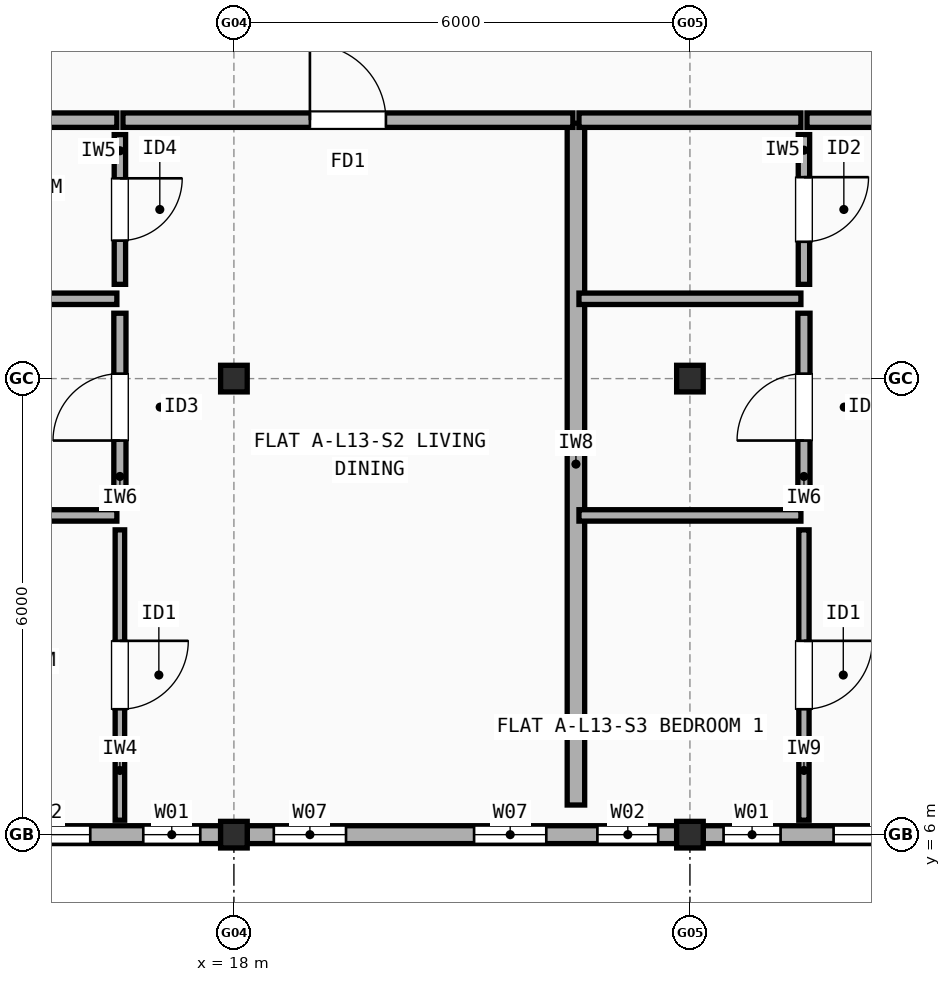
"""IFC4 building model, lengths in metres.
Left out: names, types, materials, properties, quantities, classifications, styles, units other than length and angle.
Written with IfcOpenShell. Run it as: python <this file> out.ifc"""

import sys

from ifc_helpers import new_model, si_unit, direction, frame, frame_2d, origin, origin_2d, place, context, subcontext, project, spatial, rectangle, extrude, element, fill, save


model = new_model("IFC4")
c1 = context("Model", 3, precision=1e-05, world=origin(), true_north=direction((0.0, 1.0)))
c2 = subcontext(c1, "Body", "Model", "MODEL_VIEW")
j1 = project(units=[si_unit("LENGTHUNIT", "METRE"), si_unit("PLANEANGLEUNIT", "RADIAN")], contexts=[c1])
p1 = place(None, origin())
s1 = spatial("IfcSite", under=j1, at=p1, CompositionType="ELEMENT")
p2 = place(p1, origin())
s2 = spatial("IfcBuilding", under=s1, at=p2, CompositionType="ELEMENT")
p3 = place(p2, frame((0.0, 0.0, 42.9)))
s3 = spatial("IfcBuildingStorey", under=s2, at=p3, CompositionType="ELEMENT", Elevation=42.9)
for number, where, z_axis, x_axis in (
    (1, (18.0, 6.0, 0.0), (0.0, 0.0, 1.0), (1.0, 0.0, 0.0)),
    (2, (18.0, 12.0, 0.0), (0.0, 0.0, 1.0), (1.0, 0.0, 0.0)),
    (3, (24.0, 6.0, 0.0), (0.0, 0.0, 1.0), (1.0, 0.0, 0.0)),
    (4, (24.0, 12.0, 0.0), (0.0, 0.0, 1.0), (1.0, 0.0, 0.0)),
):
    element("IfcColumn", number, at=place(p3, frame(where, z_axis=z_axis, x_axis=x_axis)), inside=s3, PredefinedType="COLUMN", context=c2, shape_type="SweptSolid", body=[
        extrude(rectangle(XDim=0.35, YDim=0.35, at=origin_2d()), origin(), (0.0, 0.0, 1.0), 3.005),
    ])
p4 = place(p3, frame((12.175, 6.0, 0.0), z_axis=(0.0, 0.0, 1.0), x_axis=(1.0, 0.0, 0.0)))
e5 = element("IfcWall", 5, at=p4, inside=s3, PredefinedType="STANDARD", context=c2, shape_type="SweptSolid", body=[
    extrude(rectangle(XDim=5.65, YDim=0.235, at=frame_2d((2.825, 0.0))), origin(), (0.0, 0.0, 1.0), 2.487),
])
p5 = place(p4, frame((0.35, 0.0, 0.9)))
e6 = element("IfcOpeningElement", 6, at=p5, cuts=e5, PredefinedType="OPENING", context=c2, shape_type="SweptSolid", body=[
    extrude(rectangle(XDim=1.2, YDim=1.35, at=frame_2d((0.6, 0.675))), frame((0.0, 0.127, 0.0), z_axis=(0.0, -1.0, 0.0), x_axis=(1.0, 0.0, 0.0)), (0.0, 0.0, 1.0), 0.255),
])
p6 = place(p4, frame((2.735, 0.0, 0.9)))
e7 = element("IfcOpeningElement", 7, at=p6, cuts=e5, PredefinedType="OPENING", context=c2, shape_type="SweptSolid", body=[
    extrude(rectangle(XDim=1.2, YDim=1.35, at=frame_2d((0.6, 0.675))), frame((0.0, 0.127, 0.0), z_axis=(0.0, -1.0, 0.0), x_axis=(1.0, 0.0, 0.0)), (0.0, 0.0, 1.0), 0.255),
])
p7 = place(p4, frame((4.633, 0.0, 0.9)))
e8 = element("IfcOpeningElement", 8, at=p7, cuts=e5, PredefinedType="OPENING", context=c2, shape_type="SweptSolid", body=[
    extrude(rectangle(XDim=0.75, YDim=1.15, at=frame_2d((0.375, 0.575))), frame((0.0, 0.127, 0.0), z_axis=(0.0, -1.0, 0.0), x_axis=(1.0, 0.0, 0.0)), (0.0, 0.0, 1.0), 0.255),
])
p8 = place(p3, frame((18.175, 6.0, 0.0), z_axis=(0.0, 0.0, 1.0), x_axis=(1.0, 0.0, 0.0)))
e9 = element("IfcWall", 9, at=p8, inside=s3, PredefinedType="STANDARD", context=c2, shape_type="SweptSolid", body=[
    extrude(rectangle(XDim=5.65, YDim=0.235, at=frame_2d((2.825, 0.0))), origin(), (0.0, 0.0, 1.0), 2.487),
])
p9 = place(p8, frame((0.35, 0.0, 0.9)))
e10 = element("IfcOpeningElement", 10, at=p9, cuts=e9, PredefinedType="OPENING", context=c2, shape_type="SweptSolid", body=[
    extrude(rectangle(XDim=0.95, YDim=1.35, at=frame_2d((0.475, 0.675))), frame((0.0, 0.127, 0.0), z_axis=(0.0, -1.0, 0.0), x_axis=(1.0, 0.0, 0.0)), (0.0, 0.0, 1.0), 0.255),
])
p10 = place(p8, frame((2.985, 0.0, 0.9)))
e11 = element("IfcOpeningElement", 11, at=p10, cuts=e9, PredefinedType="OPENING", context=c2, shape_type="SweptSolid", body=[
    extrude(rectangle(XDim=0.95, YDim=1.35, at=frame_2d((0.475, 0.675))), frame((0.0, 0.127, 0.0), z_axis=(0.0, -1.0, 0.0), x_axis=(1.0, 0.0, 0.0)), (0.0, 0.0, 1.0), 0.255),
])
p11 = place(p8, frame((4.607, 0.0, 0.9)))
e12 = element("IfcOpeningElement", 12, at=p11, cuts=e9, PredefinedType="OPENING", context=c2, shape_type="SweptSolid", body=[
    extrude(rectangle(XDim=0.8, YDim=1.2, at=frame_2d((0.4, 0.6))), frame((0.0, 0.127, 0.0), z_axis=(0.0, -1.0, 0.0), x_axis=(1.0, 0.0, 0.0)), (0.0, 0.0, 1.0), 0.255),
])
p12 = place(p3, frame((24.175, 6.0, 0.0), z_axis=(0.0, 0.0, 1.0), x_axis=(1.0, 0.0, 0.0)))
e13 = element("IfcWall", 13, at=p12, inside=s3, PredefinedType="STANDARD", context=c2, shape_type="SweptSolid", body=[
    extrude(rectangle(XDim=5.65, YDim=0.235, at=frame_2d((2.825, 0.0))), origin(), (0.0, 0.0, 1.0), 2.487),
])
p13 = place(p12, frame((0.268, 0.0, 0.9)))
e14 = element("IfcOpeningElement", 14, at=p13, cuts=e13, PredefinedType="OPENING", context=c2, shape_type="SweptSolid", body=[
    extrude(rectangle(XDim=0.75, YDim=1.15, at=frame_2d((0.375, 0.575))), frame((0.0, 0.127, 0.0), z_axis=(0.0, -1.0, 0.0), x_axis=(1.0, 0.0, 0.0)), (0.0, 0.0, 1.0), 0.255),
])
p14 = place(p12, frame((1.715, 0.0, 0.9)))
e15 = element("IfcOpeningElement", 15, at=p14, cuts=e13, PredefinedType="OPENING", context=c2, shape_type="SweptSolid", body=[
    extrude(rectangle(XDim=1.5, YDim=1.4, at=frame_2d((0.75, 0.7))), frame((0.0, 0.127, 0.0), z_axis=(0.0, -1.0, 0.0), x_axis=(1.0, 0.0, 0.0)), (0.0, 0.0, 1.0), 0.255),
])
p15 = place(p12, frame((3.8, 0.0, 0.9)))
e16 = element("IfcOpeningElement", 16, at=p15, cuts=e13, PredefinedType="OPENING", context=c2, shape_type="SweptSolid", body=[
    extrude(rectangle(XDim=1.5, YDim=1.4, at=frame_2d((0.75, 0.7))), frame((0.0, 0.127, 0.0), z_axis=(0.0, -1.0, 0.0), x_axis=(1.0, 0.0, 0.0)), (0.0, 0.0, 1.0), 0.255),
])
p16 = place(p3, frame((22.5, 6.39, 0.0), z_axis=(0.0, 0.0, 1.0), x_axis=(0.0, 1.0, 0.0)))
e17 = element("IfcWall", 17, at=p16, inside=s3, PredefinedType="SOLIDWALL", context=c2, shape_type="SweptSolid", body=[
    extrude(rectangle(XDim=8.97, YDim=0.23, at=frame_2d((4.485, 0.0))), origin(), (0.0, 0.0, 1.0), 2.537),
])
p17 = place(p3, frame((12.04, 15.4, 0.0), z_axis=(0.0, 0.0, 1.0), x_axis=(1.0, 0.0, 0.0)))
e18 = element("IfcWall", 18, at=p17, inside=s3, PredefinedType="SOLIDWALL", context=c2, shape_type="SweptSolid", body=[
    extrude(rectangle(XDim=4.42, YDim=0.19, at=frame_2d((2.21, 0.0))), origin(), (0.0, 0.0, 1.0), 2.458),
])
p18 = place(p3, frame((16.54, 15.4, 0.0), z_axis=(0.0, 0.0, 1.0), x_axis=(1.0, 0.0, 0.0)))
e19 = element("IfcWall", 19, at=p18, inside=s3, PredefinedType="SOLIDWALL", context=c2, shape_type="SweptSolid", body=[
    extrude(rectangle(XDim=5.92, YDim=0.19, at=frame_2d((2.96, 0.0))), origin(), (0.0, 0.0, 1.0), 2.548),
])
p19 = place(p18, frame((2.46, 0.0, 0.0)))
e20 = element("IfcOpeningElement", 20, at=p19, cuts=e19, PredefinedType="OPENING", context=c2, shape_type="SweptSolid", body=[
    extrude(rectangle(XDim=1.0, YDim=2.15, at=frame_2d((0.5, 1.075))), frame((0.0, 0.105, 0.0), z_axis=(0.0, -1.0, 0.0), x_axis=(1.0, 0.0, 0.0)), (0.0, 0.0, 1.0), 0.21),
])
p20 = place(p3, frame((16.5, 6.19, 0.0), z_axis=(0.0, 0.0, 1.0), x_axis=(0.0, 1.0, 0.0)))
e21 = element("IfcWall", 21, at=p20, inside=s3, PredefinedType="PARTITIONING", context=c2, shape_type="SweptSolid", body=[
    extrude(rectangle(XDim=3.82, YDim=0.125, at=frame_2d((1.91, 0.0))), origin(), (0.0, 0.0, 1.0), 3.005),
])
p21 = place(p20, frame((1.46, 0.0, 0.0)))
e22 = element("IfcOpeningElement", 22, at=p21, cuts=e21, PredefinedType="OPENING", context=c2, shape_type="SweptSolid", body=[
    extrude(rectangle(XDim=0.9, YDim=2.1, at=frame_2d((0.45, 1.05))), frame((0.0, 0.073, 0.0), z_axis=(0.0, -1.0, 0.0), x_axis=(1.0, 0.0, 0.0)), (0.0, 0.0, 1.0), 0.145),
])
p22 = place(p3, frame((16.5, 10.39, 0.0), z_axis=(0.0, 0.0, 1.0), x_axis=(0.0, 1.0, 0.0)))
e23 = element("IfcWall", 23, at=p22, inside=s3, PredefinedType="PLUMBINGWALL", context=c2, shape_type="SweptSolid", body=[
    extrude(rectangle(XDim=2.47, YDim=0.16, at=frame_2d((1.235, 0.0))), origin(), (0.0, 0.0, 1.0), 2.537),
])
p23 = place(p22, frame((0.795, 0.0, 0.0)))
e24 = element("IfcOpeningElement", 24, at=p23, cuts=e23, PredefinedType="OPENING", context=c2, shape_type="SweptSolid", body=[
    extrude(rectangle(XDim=0.88, YDim=2.1, at=frame_2d((0.44, 1.05))), frame((0.0, 0.09, 0.0), z_axis=(0.0, -1.0, 0.0), x_axis=(1.0, 0.0, 0.0)), (0.0, 0.0, 1.0), 0.18),
])
p24 = place(p3, frame((16.5, 13.24, 0.0), z_axis=(0.0, 0.0, 1.0), x_axis=(0.0, 1.0, 0.0)))
e25 = element("IfcWall", 25, at=p24, inside=s3, PredefinedType="PARTITIONING", context=c2, shape_type="SweptSolid", body=[
    extrude(rectangle(XDim=1.97, YDim=0.15, at=frame_2d((0.985, 0.0))), origin(), (0.0, 0.0, 1.0), 3.005),
])
p25 = place(p24, frame((0.575, 0.0, 0.0)))
e26 = element("IfcOpeningElement", 26, at=p25, cuts=e25, PredefinedType="OPENING", context=c2, shape_type="SweptSolid", body=[
    extrude(rectangle(XDim=0.82, YDim=2.08, at=frame_2d((0.41, 1.04))), frame((0.0, 0.085, 0.0), z_axis=(0.0, -1.0, 0.0), x_axis=(1.0, 0.0, 0.0)), (0.0, 0.0, 1.0), 0.17),
])
p26 = place(p3, frame((12.04, 10.2, 0.0), z_axis=(0.0, 0.0, 1.0), x_axis=(1.0, 0.0, 0.0)))
e27 = element("IfcWall", 27, at=p26, inside=s3, PredefinedType="PARTITIONING", context=c2, shape_type="SweptSolid", body=[
    extrude(rectangle(XDim=4.42, YDim=0.15, at=frame_2d((2.21, 0.0))), origin(), (0.0, 0.0, 1.0), 2.508),
])
p27 = place(p3, frame((12.04, 13.05, 0.0), z_axis=(0.0, 0.0, 1.0), x_axis=(1.0, 0.0, 0.0)))
e28 = element("IfcWall", 28, at=p27, inside=s3, PredefinedType="PARTITIONING", context=c2, shape_type="SweptSolid", body=[
    extrude(rectangle(XDim=4.42, YDim=0.15, at=frame_2d((2.21, 0.0))), origin(), (0.0, 0.0, 1.0), 2.458),
])
p28 = place(p3, frame((22.54, 15.4, 0.0), z_axis=(0.0, 0.0, 1.0), x_axis=(1.0, 0.0, 0.0)))
e29 = element("IfcWall", 29, at=p28, inside=s3, PredefinedType="SOLIDWALL", context=c2, shape_type="SweptSolid", body=[
    extrude(rectangle(XDim=2.92, YDim=0.19, at=frame_2d((1.46, 0.0))), origin(), (0.0, 0.0, 1.0), 2.548),
])
p29 = place(p3, frame((25.54, 15.4, 0.0), z_axis=(0.0, 0.0, 1.0), x_axis=(1.0, 0.0, 0.0)))
e30 = element("IfcWall", 30, at=p29, inside=s3, PredefinedType="SOLIDWALL", context=c2, shape_type="SweptSolid", body=[
    extrude(rectangle(XDim=4.42, YDim=0.19, at=frame_2d((2.21, 0.0))), origin(), (0.0, 0.0, 1.0), 2.487),
])
p30 = place(p29, frame((1.72, 0.0, 0.0)))
e31 = element("IfcOpeningElement", 31, at=p30, cuts=e30, PredefinedType="OPENING", context=c2, shape_type="SweptSolid", body=[
    extrude(rectangle(XDim=0.98, YDim=2.15, at=frame_2d((0.49, 1.075))), frame((0.0, 0.105, 0.0), z_axis=(0.0, -1.0, 0.0), x_axis=(1.0, 0.0, 0.0)), (0.0, 0.0, 1.0), 0.21),
])
p31 = place(p3, frame((25.5, 6.19, 0.0), z_axis=(0.0, 0.0, 1.0), x_axis=(0.0, 1.0, 0.0)))
e32 = element("IfcWall", 32, at=p31, inside=s3, PredefinedType="PARTITIONING", context=c2, shape_type="SweptSolid", body=[
    extrude(rectangle(XDim=3.82, YDim=0.135, at=frame_2d((1.91, 0.0))), origin(), (0.0, 0.0, 1.0), 3.005),
])
p32 = place(p31, frame((1.46, 0.0, 0.0)))
e33 = element("IfcOpeningElement", 33, at=p32, cuts=e32, PredefinedType="OPENING", context=c2, shape_type="SweptSolid", body=[
    extrude(rectangle(XDim=0.9, YDim=2.1, at=frame_2d((0.45, 1.05))), frame((0.0, 0.077, 0.0), z_axis=(0.0, -1.0, 0.0), x_axis=(1.0, 0.0, 0.0)), (0.0, 0.0, 1.0), 0.155),
])
p33 = place(p3, frame((25.5, 10.39, 0.0), z_axis=(0.0, 0.0, 1.0), x_axis=(0.0, 1.0, 0.0)))
e34 = element("IfcWall", 34, at=p33, inside=s3, PredefinedType="PLUMBINGWALL", context=c2, shape_type="SweptSolid", body=[
    extrude(rectangle(XDim=2.47, YDim=0.16, at=frame_2d((1.235, 0.0))), origin(), (0.0, 0.0, 1.0), 2.537),
])
p34 = place(p33, frame((0.795, 0.0, 0.0)))
e35 = element("IfcOpeningElement", 35, at=p34, cuts=e34, PredefinedType="OPENING", context=c2, shape_type="SweptSolid", body=[
    extrude(rectangle(XDim=0.88, YDim=2.1, at=frame_2d((0.44, 1.05))), frame((0.0, 0.09, 0.0), z_axis=(0.0, -1.0, 0.0), x_axis=(1.0, 0.0, 0.0)), (0.0, 0.0, 1.0), 0.18),
])
p35 = place(p3, frame((25.5, 13.24, 0.0), z_axis=(0.0, 0.0, 1.0), x_axis=(0.0, 1.0, 0.0)))
e36 = element("IfcWall", 36, at=p35, inside=s3, PredefinedType="PARTITIONING", context=c2, shape_type="SweptSolid", body=[
    extrude(rectangle(XDim=1.97, YDim=0.15, at=frame_2d((0.985, 0.0))), origin(), (0.0, 0.0, 1.0), 3.005),
])
p36 = place(p35, frame((0.56, 0.0, 0.0)))
e37 = element("IfcOpeningElement", 37, at=p36, cuts=e36, PredefinedType="OPENING", context=c2, shape_type="SweptSolid", body=[
    extrude(rectangle(XDim=0.85, YDim=2.1, at=frame_2d((0.425, 1.05))), frame((0.0, 0.085, 0.0), z_axis=(0.0, -1.0, 0.0), x_axis=(1.0, 0.0, 0.0)), (0.0, 0.0, 1.0), 0.17),
])
p37 = place(p3, frame((22.54, 10.2, 0.0), z_axis=(0.0, 0.0, 1.0), x_axis=(1.0, 0.0, 0.0)))
e38 = element("IfcWall", 38, at=p37, inside=s3, PredefinedType="PARTITIONING", context=c2, shape_type="SweptSolid", body=[
    extrude(rectangle(XDim=2.92, YDim=0.15, at=frame_2d((1.46, 0.0))), origin(), (0.0, 0.0, 1.0), 2.458),
])
p38 = place(p3, frame((22.54, 13.05, 0.0), z_axis=(0.0, 0.0, 1.0), x_axis=(1.0, 0.0, 0.0)))
e39 = element("IfcWall", 39, at=p38, inside=s3, PredefinedType="PARTITIONING", context=c2, shape_type="SweptSolid", body=[
    extrude(rectangle(XDim=2.92, YDim=0.15, at=frame_2d((1.46, 0.0))), origin(), (0.0, 0.0, 1.0), 2.548),
])
p39 = place(p6, origin())
e40 = element("IfcWindow", 40, at=p39, inside=s3, PartitioningType="SINGLE_PANEL", PredefinedType="WINDOW", context=c2, shape_type="SweptSolid", body=[
    extrude(rectangle(XDim=1.2, YDim=1.35, at=frame_2d((0.6, 0.675))), frame((0.0, 0.03, 0.0), z_axis=(0.0, -1.0, 0.0), x_axis=(1.0, 0.0, 0.0)), (0.0, 0.0, 1.0), 0.06),
])
fill(e7, e40)
p40 = place(p7, origin())
e41 = element("IfcWindow", 41, at=p40, inside=s3, PartitioningType="SINGLE_PANEL", PredefinedType="WINDOW", context=c2, shape_type="SweptSolid", body=[
    extrude(rectangle(XDim=0.75, YDim=1.15, at=frame_2d((0.375, 0.575))), frame((0.0, 0.03, 0.0), z_axis=(0.0, -1.0, 0.0), x_axis=(1.0, 0.0, 0.0)), (0.0, 0.0, 1.0), 0.06),
])
fill(e8, e41)
p41 = place(p9, origin())
e42 = element("IfcWindow", 42, at=p41, inside=s3, PartitioningType="SINGLE_PANEL", PredefinedType="WINDOW", context=c2, shape_type="SweptSolid", body=[
    extrude(rectangle(XDim=0.95, YDim=1.35, at=frame_2d((0.475, 0.675))), frame((0.0, 0.03, 0.0), z_axis=(0.0, -1.0, 0.0), x_axis=(1.0, 0.0, 0.0)), (0.0, 0.0, 1.0), 0.06),
])
fill(e10, e42)
p42 = place(p10, origin())
e43 = element("IfcWindow", 43, at=p42, inside=s3, PartitioningType="SINGLE_PANEL", PredefinedType="WINDOW", context=c2, shape_type="SweptSolid", body=[
    extrude(rectangle(XDim=0.95, YDim=1.35, at=frame_2d((0.475, 0.675))), frame((0.0, 0.03, 0.0), z_axis=(0.0, -1.0, 0.0), x_axis=(1.0, 0.0, 0.0)), (0.0, 0.0, 1.0), 0.06),
])
fill(e11, e43)
p43 = place(p11, origin())
e44 = element("IfcWindow", 44, at=p43, inside=s3, PartitioningType="SINGLE_PANEL", PredefinedType="WINDOW", context=c2, shape_type="SweptSolid", body=[
    extrude(rectangle(XDim=0.8, YDim=1.2, at=frame_2d((0.4, 0.6))), frame((0.0, 0.03, 0.0), z_axis=(0.0, -1.0, 0.0), x_axis=(1.0, 0.0, 0.0)), (0.0, 0.0, 1.0), 0.06),
])
fill(e12, e44)
p44 = place(p13, origin())
e45 = element("IfcWindow", 45, at=p44, inside=s3, PartitioningType="SINGLE_PANEL", PredefinedType="WINDOW", context=c2, shape_type="SweptSolid", body=[
    extrude(rectangle(XDim=0.75, YDim=1.15, at=frame_2d((0.375, 0.575))), frame((0.0, 0.03, 0.0), z_axis=(0.0, -1.0, 0.0), x_axis=(1.0, 0.0, 0.0)), (0.0, 0.0, 1.0), 0.06),
])
fill(e14, e45)
p45 = place(p14, origin())
e46 = element("IfcWindow", 46, at=p45, inside=s3, PartitioningType="SINGLE_PANEL", PredefinedType="WINDOW", context=c2, shape_type="SweptSolid", body=[
    extrude(rectangle(XDim=1.5, YDim=1.4, at=frame_2d((0.75, 0.7))), frame((0.0, 0.03, 0.0), z_axis=(0.0, -1.0, 0.0), x_axis=(1.0, 0.0, 0.0)), (0.0, 0.0, 1.0), 0.06),
])
fill(e15, e46)
p46 = place(p19, origin())
e47 = element("IfcDoor", 47, at=p46, inside=s3, OperationType="SINGLE_SWING_LEFT", PredefinedType="DOOR", context=c2, shape_type="SweptSolid", body=[
    extrude(rectangle(XDim=1.0, YDim=2.15, at=frame_2d((0.5, 1.075))), frame((0.0, 0.025, 0.0), z_axis=(0.0, -1.0, 0.0), x_axis=(1.0, 0.0, 0.0)), (0.0, 0.0, 1.0), 0.05),
])
fill(e20, e47)
p47 = place(p21, origin())
e48 = element("IfcDoor", 48, at=p47, inside=s3, OperationType="SINGLE_SWING_RIGHT", PredefinedType="DOOR", context=c2, shape_type="SweptSolid", body=[
    extrude(rectangle(XDim=0.9, YDim=2.1, at=frame_2d((0.45, 1.05))), frame((0.0, 0.025, 0.0), z_axis=(0.0, -1.0, 0.0), x_axis=(1.0, 0.0, 0.0)), (0.0, 0.0, 1.0), 0.05),
])
fill(e22, e48)
p48 = place(p23, origin())
e49 = element("IfcDoor", 49, at=p48, inside=s3, OperationType="SINGLE_SWING_LEFT", PredefinedType="DOOR", context=c2, shape_type="SweptSolid", body=[
    extrude(rectangle(XDim=0.88, YDim=2.1, at=frame_2d((0.44, 1.05))), frame((0.0, 0.025, 0.0), z_axis=(0.0, -1.0, 0.0), x_axis=(1.0, 0.0, 0.0)), (0.0, 0.0, 1.0), 0.05),
])
fill(e24, e49)
p49 = place(p25, origin())
e50 = element("IfcDoor", 50, at=p49, inside=s3, OperationType="SINGLE_SWING_RIGHT", PredefinedType="DOOR", context=c2, shape_type="SweptSolid", body=[
    extrude(rectangle(XDim=0.82, YDim=2.08, at=frame_2d((0.41, 1.04))), frame((0.0, 0.025, 0.0), z_axis=(0.0, -1.0, 0.0), x_axis=(1.0, 0.0, 0.0)), (0.0, 0.0, 1.0), 0.05),
])
fill(e26, e50)
p50 = place(p32, origin())
e51 = element("IfcDoor", 51, at=p50, inside=s3, OperationType="SINGLE_SWING_RIGHT", PredefinedType="DOOR", context=c2, shape_type="SweptSolid", body=[
    extrude(rectangle(XDim=0.9, YDim=2.1, at=frame_2d((0.45, 1.05))), frame((0.0, 0.025, 0.0), z_axis=(0.0, -1.0, 0.0), x_axis=(1.0, 0.0, 0.0)), (0.0, 0.0, 1.0), 0.05),
])
fill(e33, e51)
p51 = place(p34, origin())
e52 = element("IfcDoor", 52, at=p51, inside=s3, OperationType="SINGLE_SWING_LEFT", PredefinedType="DOOR", context=c2, shape_type="SweptSolid", body=[
    extrude(rectangle(XDim=0.88, YDim=2.1, at=frame_2d((0.44, 1.05))), frame((0.0, 0.025, 0.0), z_axis=(0.0, -1.0, 0.0), x_axis=(1.0, 0.0, 0.0)), (0.0, 0.0, 1.0), 0.05),
])
fill(e35, e52)
p52 = place(p36, origin())
e53 = element("IfcDoor", 53, at=p52, inside=s3, OperationType="SINGLE_SWING_RIGHT", PredefinedType="DOOR", context=c2, shape_type="SweptSolid", body=[
    extrude(rectangle(XDim=0.85, YDim=2.1, at=frame_2d((0.425, 1.05))), frame((0.0, 0.025, 0.0), z_axis=(0.0, -1.0, 0.0), x_axis=(1.0, 0.0, 0.0)), (0.0, 0.0, 1.0), 0.05),
])
fill(e37, e53)
save(model, sys.argv[1])
